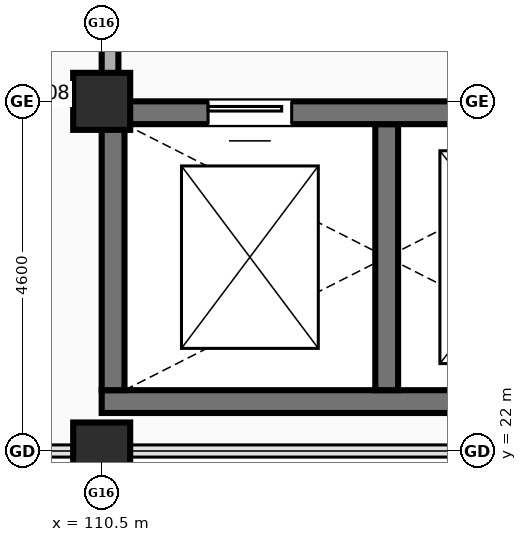
"""IFC4 building model, lengths in metres.
Left out: names, types, materials, properties, quantities, classifications, styles, units other than length and angle.
Written with IfcOpenShell. Run it as: python <this file> out.ifc"""

import sys

from ifc_helpers import new_model, si_unit, direction, frame, frame_2d, origin, origin_2d, place, context, subcontext, project, spatial, rectangle, extrude, element, fill, save


model = new_model("IFC4")
c1 = context("Model", 3, precision=1e-05, world=origin(), true_north=direction((0.0, 1.0)))
c2 = subcontext(c1, "Body", "Model", "MODEL_VIEW")
j1 = project(units=[si_unit("LENGTHUNIT", "METRE"), si_unit("PLANEANGLEUNIT", "RADIAN")], contexts=[c1])
p1 = place(None, origin())
s1 = spatial("IfcSite", under=j1, at=p1, CompositionType="ELEMENT")
p2 = place(p1, origin())
s2 = spatial("IfcBuilding", under=s1, at=p2, CompositionType="ELEMENT")
p3 = place(p2, frame((0.0, 0.0, 9.8)))
s3 = spatial("IfcBuildingStorey", under=s2, at=p3, CompositionType="ELEMENT", Elevation=9.8)
for number, where, z_axis, x_axis in (
    (1, (110.5, 22.0, 0.0), (0.0, 0.0, 1.0), (1.0, 0.0, 0.0)),
    (2, (110.5, 26.6, 0.0), (0.0, 0.0, 1.0), (1.0, 0.0, 0.0)),
):
    element("IfcColumn", number, at=place(p3, frame(where, z_axis=z_axis, x_axis=x_axis)), inside=s3, PredefinedType="COLUMN", context=c2, shape_type="SweptSolid", body=[
        extrude(rectangle(XDim=0.75, YDim=0.75, at=origin_2d()), origin(), (0.0, 0.0, 1.0), 4.4),
    ])
p4 = place(p3, frame((110.5, 22.65, 0.0), z_axis=(0.0, 0.0, 1.0), x_axis=(1.0, 0.0, 0.0)))
e3 = element("IfcWall", 3, at=p4, inside=s3, PredefinedType="SHEAR", context=c2, shape_type="SweptSolid", body=[
    extrude(rectangle(XDim=7.5, YDim=0.3, at=frame_2d((3.75, 0.0))), origin(), (0.0, 0.0, 1.0), 4.4),
])
for number, where, z_axis, x_axis in (
    (4, (110.65, 22.8, 0.0), (0.0, 0.0, 1.0), (0.0, 1.0, 0.0)),
    (5, (114.25, 22.8, 0.0), (0.0, 0.0, 1.0), (0.0, 1.0, 0.0)),
):
    element("IfcWall", number, at=place(p3, frame(where, z_axis=z_axis, x_axis=x_axis)), inside=s3, PredefinedType="SHEAR", context=c2, shape_type="SweptSolid", body=[
        extrude(rectangle(XDim=3.5, YDim=0.3, at=frame_2d((1.75, 0.0))), origin(), (0.0, 0.0, 1.0), 4.4),
    ])
p5 = place(p3, frame((110.5, 26.45, 0.0), z_axis=(0.0, 0.0, 1.0), x_axis=(1.0, 0.0, 0.0)))
e6 = element("IfcWall", 6, at=p5, inside=s3, PredefinedType="SHEAR", context=c2, shape_type="SweptSolid", body=[
    extrude(rectangle(XDim=7.5, YDim=0.3, at=frame_2d((3.75, 0.0))), origin(), (0.0, 0.0, 1.0), 4.4),
])
p6 = place(p5, frame((1.4, 0.0, 0.0)))
e7 = element("IfcOpeningElement", 7, at=p6, cuts=e6, PredefinedType="OPENING", context=c2, shape_type="SweptSolid", body=[
    extrude(rectangle(XDim=1.1, YDim=2.15, at=frame_2d((0.55, 1.075))), frame((0.0, 0.16, 0.0), z_axis=(0.0, -1.0, 0.0), x_axis=(1.0, 0.0, 0.0)), (0.0, 0.0, 1.0), 0.32),
])
p7 = place(p5, frame((5.0, 0.0, 0.0)))
e8 = element("IfcOpeningElement", 8, at=p7, cuts=e6, PredefinedType="OPENING", context=c2, shape_type="SweptSolid", body=[
    extrude(rectangle(XDim=1.6, YDim=2.25, at=frame_2d((0.8, 1.125))), frame((0.0, 0.16, 0.0), z_axis=(0.0, -1.0, 0.0), x_axis=(1.0, 0.0, 0.0)), (0.0, 0.0, 1.0), 0.32),
])
p8 = place(p3, frame((110.61, 26.75, 0.0), z_axis=(0.0, 0.0, 1.0), x_axis=(0.0, 1.0, 0.0)))
e9 = element("IfcWall", 9, at=p8, inside=s3, PredefinedType="SOLIDWALL", context=c2, shape_type="SweptSolid", body=[
    extrude(rectangle(XDim=3.83, YDim=0.22, at=frame_2d((1.915, 0.0))), origin(), (0.0, 0.0, 1.0), 3.3),
])
p9 = place(p6, origin())
e10 = element("IfcDoor", 10, at=p9, inside=s3, OperationType="SLIDING_TO_LEFT", PredefinedType="DOOR", context=c2, shape_type="SweptSolid", body=[
    extrude(rectangle(XDim=1.1, YDim=2.15, at=frame_2d((0.55, 1.075))), frame((0.0, 0.025, 0.0), z_axis=(0.0, -1.0, 0.0), x_axis=(1.0, 0.0, 0.0)), (0.0, 0.0, 1.0), 0.05),
])
fill(e7, e10)
save(model, sys.argv[1])
